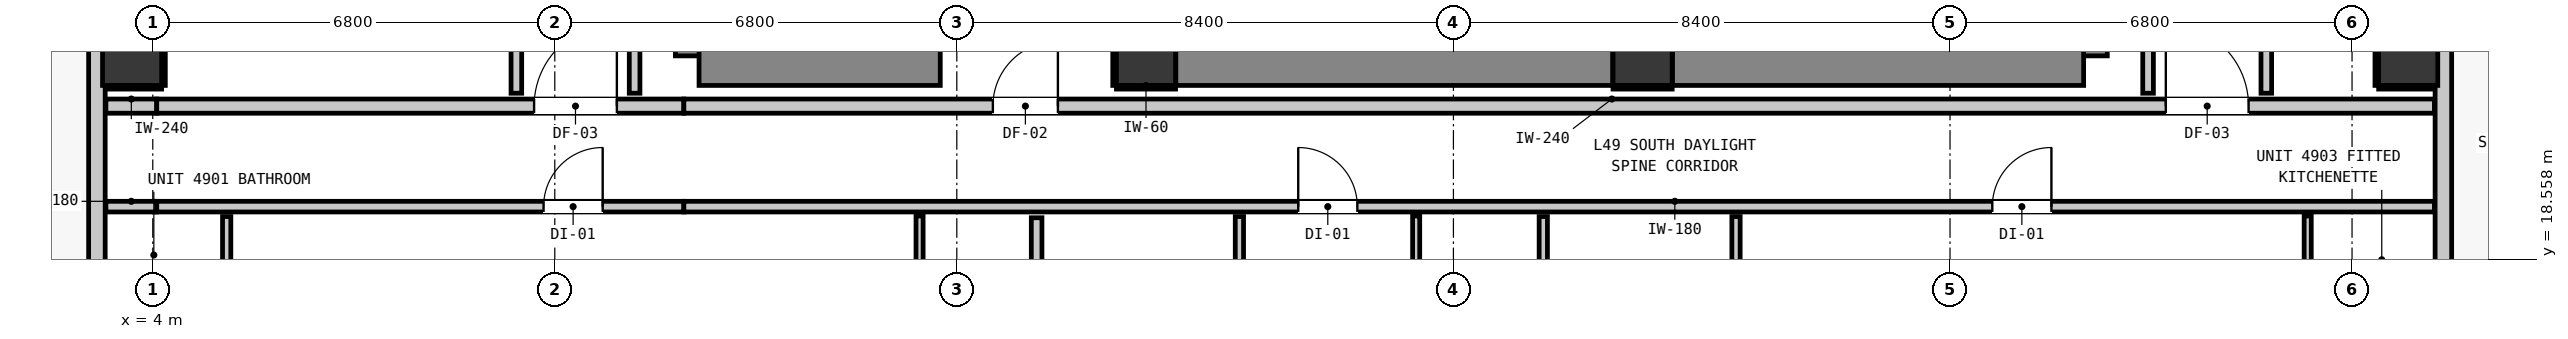
"""IFC4 building model, lengths in metres.
Left out: names, types, materials, properties, quantities, classifications, styles, units other than length and angle.
Written with IfcOpenShell. Run it as: python <this file> out.ifc"""

import sys

from ifc_helpers import new_model, si_unit, direction, frame, frame_2d, origin, origin_2d, place, context, subcontext, project, spatial, rectangle, extrude, element, fill, save


model = new_model("IFC4")
c1 = context("Model", 3, precision=1e-05, world=origin(), true_north=direction((0.0, 1.0)))
c2 = subcontext(c1, "Body", "Model", "MODEL_VIEW")
j1 = project(units=[si_unit("LENGTHUNIT", "METRE"), si_unit("PLANEANGLEUNIT", "RADIAN")], contexts=[c1])
p1 = place(None, origin())
s1 = spatial("IfcSite", under=j1, at=p1, CompositionType="ELEMENT")
p2 = place(p1, origin())
s2 = spatial("IfcBuilding", under=s1, at=p2, CompositionType="ELEMENT")
p3 = place(p2, frame((0.0, 0.0, 169.16)))
s3 = spatial("IfcBuildingStorey", under=s2, at=p3, CompositionType="ELEMENT", Elevation=169.16)
for number, where, z_axis, x_axis in (
    (1, (20.8, 22.0, 0.0), (0.0, 0.0, 1.0), (1.0, 0.0, 0.0)),
    (2, (29.2, 22.0, 0.0), (0.0, 0.0, 1.0), (1.0, 0.0, 0.0)),
):
    element("IfcColumn", number, at=place(p3, frame(where, z_axis=z_axis, x_axis=x_axis)), inside=s3, PredefinedType="COLUMN", context=c2, shape_type="SweptSolid", body=[
        extrude(rectangle(XDim=1.0, YDim=1.0, at=origin_2d()), origin(), (0.0, 0.0, 1.0), 3.32),
    ])
p4 = place(p3, frame((13.34, 22.0, 0.0), z_axis=(0.0, 0.0, 1.0), x_axis=(0.0, 1.0, 0.0)))
e3 = element("IfcWall", 3, at=p4, inside=s3, PredefinedType="SHEAR", context=c2, shape_type="SweptSolid", body=[
    extrude(rectangle(XDim=8.195, YDim=1.0, at=frame_2d((4.098, 0.0))), origin(), (0.0, 0.0, 1.0), 3.32),
])
p5 = place(p3, frame((13.24, 22.0, 0.0), z_axis=(0.0, 0.0, 1.0), x_axis=(1.0, 0.0, 0.0)))
e4 = element("IfcWall", 4, at=p5, inside=s3, PredefinedType="SHEAR", context=c2, shape_type="SweptSolid", body=[
    extrude(rectangle(XDim=4.08, YDim=1.0, at=frame_2d((2.04, 0.0))), origin(), (0.0, 0.0, 1.0), 3.32),
])
p6 = place(p3, frame((36.56, 22.0, 0.0), z_axis=(0.0, 0.0, 1.0), x_axis=(0.0, 1.0, 0.0)))
e5 = element("IfcWall", 5, at=p6, inside=s3, PredefinedType="SHEAR", context=c2, shape_type="SweptSolid", body=[
    extrude(rectangle(XDim=8.195, YDim=1.0, at=frame_2d((4.098, 0.0))), origin(), (0.0, 0.0, 1.0), 3.32),
])
p7 = place(p3, frame((29.705, 22.0, 0.0), z_axis=(0.0, 0.0, 1.0), x_axis=(1.0, 0.0, 0.0)))
e6 = element("IfcWall", 6, at=p7, inside=s3, PredefinedType="SHEAR", context=c2, shape_type="SweptSolid", body=[
    extrude(rectangle(XDim=6.955, YDim=1.0, at=frame_2d((3.478, 0.0))), origin(), (0.0, 0.0, 1.0), 3.32),
])
p8 = place(p3, frame((21.305, 22.0, 0.0), z_axis=(0.0, 0.0, 1.0), x_axis=(1.0, 0.0, 0.0)))
e7 = element("IfcWall", 7, at=p8, inside=s3, PredefinedType="SHEAR", context=c2, shape_type="SweptSolid", body=[
    extrude(rectangle(XDim=7.39, YDim=1.0, at=frame_2d((3.695, 0.0))), origin(), (0.0, 0.0, 1.0), 3.32),
])
for number, where, z_axis, x_axis in (
    (8, (3.65, 22.0, 0.0), (0.0, 0.0, 1.0), (1.0, 0.0, 0.0)),
    (9, (42.15, 22.0, 0.0), (0.0, 0.0, 1.0), (1.0, 0.0, 0.0)),
):
    element("IfcColumn", number, at=place(p3, frame(where, z_axis=z_axis, x_axis=x_axis)), inside=s3, PredefinedType="COLUMN", context=c2, shape_type="SweptSolid", body=[
        extrude(rectangle(XDim=1.0, YDim=1.0, at=origin_2d()), origin(), (0.0, 0.0, 1.0), 3.32),
    ])
p9 = place(p3, frame((3.055, 17.555, 0.0), z_axis=(0.0, 0.0, 1.0), x_axis=(0.0, 1.0, 0.0)))
e10 = element("IfcWall", 10, at=p9, inside=s3, PredefinedType="STANDARD", context=c2, shape_type="SweptSolid", body=[
    extrude(rectangle(XDim=32.29, YDim=0.28, at=frame_2d((16.145, 0.0))), origin(), (0.0, 0.0, 1.0), 2.96),
])
p10 = place(p9, frame((6.871, 0.0, 0.0)))
e11 = element("IfcOpeningElement", 11, at=p10, cuts=e10, PredefinedType="OPENING", context=c2, shape_type="SweptSolid", body=[
    extrude(rectangle(XDim=1.0, YDim=2.15, at=frame_2d((0.5, 1.075))), frame((0.0, 0.15, 0.0), z_axis=(0.0, -1.0, 0.0), x_axis=(1.0, 0.0, 0.0)), (0.0, 0.0, 1.0), 0.3),
])
p11 = place(p9, frame((30.753, 0.0, 0.85)))
e12 = element("IfcOpeningElement", 12, at=p11, cuts=e10, PredefinedType="OPENING", context=c2, shape_type="SweptSolid", body=[
    extrude(rectangle(XDim=1.05, YDim=1.65, at=frame_2d((0.525, 0.825))), frame((0.0, 0.15, 0.0), z_axis=(0.0, -1.0, 0.0), x_axis=(1.0, 0.0, 0.0)), (0.0, 0.0, 1.0), 0.3),
])
p12 = place(p9, frame((8.6, 0.0, 0.85)))
e13 = element("IfcOpeningElement", 13, at=p12, cuts=e10, PredefinedType="OPENING", context=c2, shape_type="SweptSolid", body=[
    extrude(rectangle(XDim=1.05, YDim=1.65, at=frame_2d((0.525, 0.825))), frame((0.0, 0.15, 0.0), z_axis=(0.0, -1.0, 0.0), x_axis=(1.0, 0.0, 0.0)), (0.0, 0.0, 1.0), 0.3),
])
p13 = place(p9, frame((10.612, 0.0, 0.85)))
e14 = element("IfcOpeningElement", 14, at=p13, cuts=e10, PredefinedType="OPENING", context=c2, shape_type="SweptSolid", body=[
    extrude(rectangle(XDim=1.8, YDim=1.9, at=frame_2d((0.9, 0.95))), frame((0.0, 0.15, 0.0), z_axis=(0.0, -1.0, 0.0), x_axis=(1.0, 0.0, 0.0)), (0.0, 0.0, 1.0), 0.3),
])
p14 = place(p9, frame((16.925, 0.0, 0.85)))
e15 = element("IfcOpeningElement", 15, at=p14, cuts=e10, PredefinedType="OPENING", context=c2, shape_type="SweptSolid", body=[
    extrude(rectangle(XDim=1.8, YDim=1.9, at=frame_2d((0.9, 0.95))), frame((0.0, 0.15, 0.0), z_axis=(0.0, -1.0, 0.0), x_axis=(1.0, 0.0, 0.0)), (0.0, 0.0, 1.0), 0.3),
])
p15 = place(p9, frame((20.113, 0.0, 0.85)))
e16 = element("IfcOpeningElement", 16, at=p15, cuts=e10, PredefinedType="OPENING", context=c2, shape_type="SweptSolid", body=[
    extrude(rectangle(XDim=1.05, YDim=1.65, at=frame_2d((0.525, 0.825))), frame((0.0, 0.15, 0.0), z_axis=(0.0, -1.0, 0.0), x_axis=(1.0, 0.0, 0.0)), (0.0, 0.0, 1.0), 0.3),
])
p16 = place(p3, frame((42.745, 49.845, 0.0), z_axis=(0.0, 0.0, 1.0), x_axis=(0.0, -1.0, 0.0)))
e17 = element("IfcWall", 17, at=p16, inside=s3, PredefinedType="STANDARD", context=c2, shape_type="SweptSolid", body=[
    extrude(rectangle(XDim=32.29, YDim=0.28, at=frame_2d((16.145, 0.0))), origin(), (0.0, 0.0, 1.0), 2.96),
])
p17 = place(p16, frame((0.904, 0.0, 0.0)))
e18 = element("IfcOpeningElement", 18, at=p17, cuts=e17, PredefinedType="OPENING", context=c2, shape_type="SweptSolid", body=[
    extrude(rectangle(XDim=1.0, YDim=2.15, at=frame_2d((0.5, 1.075))), frame((0.0, 0.15, 0.0), z_axis=(0.0, -1.0, 0.0), x_axis=(1.0, 0.0, 0.0)), (0.0, 0.0, 1.0), 0.3),
])
p18 = place(p16, frame((2.699, 0.0, 0.85)))
e19 = element("IfcOpeningElement", 19, at=p18, cuts=e17, PredefinedType="OPENING", context=c2, shape_type="SweptSolid", body=[
    extrude(rectangle(XDim=1.8, YDim=1.9, at=frame_2d((0.9, 0.95))), frame((0.0, 0.15, 0.0), z_axis=(0.0, -1.0, 0.0), x_axis=(1.0, 0.0, 0.0)), (0.0, 0.0, 1.0), 0.3),
])
p19 = place(p16, frame((23.02, 0.0, 0.85)))
e20 = element("IfcOpeningElement", 20, at=p19, cuts=e17, PredefinedType="OPENING", context=c2, shape_type="SweptSolid", body=[
    extrude(rectangle(XDim=1.8, YDim=1.9, at=frame_2d((0.9, 0.95))), frame((0.0, 0.15, 0.0), z_axis=(0.0, -1.0, 0.0), x_axis=(1.0, 0.0, 0.0)), (0.0, 0.0, 1.0), 0.3),
])
p20 = place(p16, frame((13.47, 0.0, 0.85)))
e21 = element("IfcOpeningElement", 21, at=p20, cuts=e17, PredefinedType="OPENING", context=c2, shape_type="SweptSolid", body=[
    extrude(rectangle(XDim=1.8, YDim=1.9, at=frame_2d((0.9, 0.95))), frame((0.0, 0.15, 0.0), z_axis=(0.0, -1.0, 0.0), x_axis=(1.0, 0.0, 0.0)), (0.0, 0.0, 1.0), 0.3),
])
p21 = place(p3, frame((3.207, 21.15, 0.0), z_axis=(0.0, 0.0, 1.0), x_axis=(1.0, 0.0, 0.0)))
e22 = element("IfcWall", 22, at=p21, inside=s3, PredefinedType="PARTITIONING", context=c2, shape_type="SweptSolid", body=[
    extrude(rectangle(XDim=0.86, YDim=0.24, at=frame_2d((0.43, 0.0))), origin(), (0.0, 0.0, 1.0), 2.96),
])
p22 = place(p3, frame((4.067, 21.15, 0.0), z_axis=(0.0, 0.0, 1.0), x_axis=(1.0, 0.0, 0.0)))
e23 = element("IfcWall", 23, at=p22, inside=s3, PredefinedType="PARTITIONING", context=c2, shape_type="SweptSolid", body=[
    extrude(rectangle(XDim=8.916, YDim=0.24, at=frame_2d((4.458, 0.0))), origin(), (0.0, 0.0, 1.0), 2.445),
])
p23 = place(p22, frame((6.383, 0.0, 0.0)))
e24 = element("IfcOpeningElement", 24, at=p23, cuts=e23, PredefinedType="OPENING", context=c2, shape_type="SweptSolid", body=[
    extrude(rectangle(XDim=1.4, YDim=2.15, at=frame_2d((0.7, 1.075))), frame((0.0, 0.13, 0.0), z_axis=(0.0, -1.0, 0.0), x_axis=(1.0, 0.0, 0.0)), (0.0, 0.0, 1.0), 0.26),
])
p24 = place(p3, frame((12.983, 21.15, 0.0), z_axis=(0.0, 0.0, 1.0), x_axis=(1.0, 0.0, 0.0)))
e25 = element("IfcWall", 25, at=p24, inside=s3, PredefinedType="PARTITIONING", context=c2, shape_type="SweptSolid", body=[
    extrude(rectangle(XDim=29.61, YDim=0.24, at=frame_2d((14.805, 0.0))), origin(), (0.0, 0.0, 1.0), 2.96),
])
p25 = place(p24, frame((5.227, 0.0, 0.0)))
e26 = element("IfcOpeningElement", 26, at=p25, cuts=e25, PredefinedType="OPENING", context=c2, shape_type="SweptSolid", body=[
    extrude(rectangle(XDim=1.1, YDim=2.15, at=frame_2d((0.55, 1.075))), frame((0.0, 0.13, 0.0), z_axis=(0.0, -1.0, 0.0), x_axis=(1.0, 0.0, 0.0)), (0.0, 0.0, 1.0), 0.26),
])
p26 = place(p24, frame((25.067, 0.0, 0.0)))
e27 = element("IfcOpeningElement", 27, at=p26, cuts=e25, PredefinedType="OPENING", context=c2, shape_type="SweptSolid", body=[
    extrude(rectangle(XDim=1.4, YDim=2.15, at=frame_2d((0.7, 1.075))), frame((0.0, 0.13, 0.0), z_axis=(0.0, -1.0, 0.0), x_axis=(1.0, 0.0, 0.0)), (0.0, 0.0, 1.0), 0.26),
])
p27 = place(p3, frame((3.207, 19.45, 0.0), z_axis=(0.0, 0.0, 1.0), x_axis=(1.0, 0.0, 0.0)))
e28 = element("IfcWall", 28, at=p27, inside=s3, PredefinedType="PARTITIONING", context=c2, shape_type="SweptSolid", body=[
    extrude(rectangle(XDim=0.86, YDim=0.18, at=frame_2d((0.43, 0.0))), origin(), (0.0, 0.0, 1.0), 2.96),
])
p28 = place(p3, frame((4.067, 19.45, 0.0), z_axis=(0.0, 0.0, 1.0), x_axis=(1.0, 0.0, 0.0)))
e29 = element("IfcWall", 29, at=p28, inside=s3, PredefinedType="PARTITIONING", context=c2, shape_type="SweptSolid", body=[
    extrude(rectangle(XDim=8.916, YDim=0.18, at=frame_2d((4.458, 0.0))), origin(), (0.0, 0.0, 1.0), 2.445),
])
p29 = place(p28, frame((6.543, 0.0, 0.0)))
e30 = element("IfcOpeningElement", 30, at=p29, cuts=e29, PredefinedType="OPENING", context=c2, shape_type="SweptSolid", body=[
    extrude(rectangle(XDim=1.0, YDim=2.15, at=frame_2d((0.5, 1.075))), frame((0.0, 0.1, 0.0), z_axis=(0.0, -1.0, 0.0), x_axis=(1.0, 0.0, 0.0)), (0.0, 0.0, 1.0), 0.2),
])
p30 = place(p3, frame((12.983, 19.45, 0.0), z_axis=(0.0, 0.0, 1.0), x_axis=(1.0, 0.0, 0.0)))
e31 = element("IfcWall", 31, at=p30, inside=s3, PredefinedType="PARTITIONING", context=c2, shape_type="SweptSolid", body=[
    extrude(rectangle(XDim=29.61, YDim=0.18, at=frame_2d((14.805, 0.0))), origin(), (0.0, 0.0, 1.0), 2.96),
])
p31 = place(p30, frame((10.392, 0.0, 0.0)))
e32 = element("IfcOpeningElement", 32, at=p31, cuts=e31, PredefinedType="OPENING", context=c2, shape_type="SweptSolid", body=[
    extrude(rectangle(XDim=1.0, YDim=2.15, at=frame_2d((0.5, 1.075))), frame((0.0, 0.1, 0.0), z_axis=(0.0, -1.0, 0.0), x_axis=(1.0, 0.0, 0.0)), (0.0, 0.0, 1.0), 0.2),
])
p32 = place(p30, frame((22.132, 0.0, 0.0)))
e33 = element("IfcOpeningElement", 33, at=p32, cuts=e31, PredefinedType="OPENING", context=c2, shape_type="SweptSolid", body=[
    extrude(rectangle(XDim=1.0, YDim=2.15, at=frame_2d((0.5, 1.075))), frame((0.0, 0.1, 0.0), z_axis=(0.0, -1.0, 0.0), x_axis=(1.0, 0.0, 0.0)), (0.0, 0.0, 1.0), 0.2),
])
p33 = place(p3, frame((10.15, 21.368, 0.0), z_axis=(0.0, 0.0, 1.0), x_axis=(0.0, 1.0, 0.0)))
e34 = element("IfcWall", 34, at=p33, inside=s3, PredefinedType="PARTITIONING", context=c2, shape_type="SweptSolid", body=[
    extrude(rectangle(XDim=2.298, YDim=0.18, at=frame_2d((1.149, 0.0))), origin(), (0.0, 0.0, 1.0), 2.96),
])
p34 = place(p3, frame((12.15, 21.368, 0.0), z_axis=(0.0, 0.0, 1.0), x_axis=(0.0, 1.0, 0.0)))
e35 = element("IfcWall", 35, at=p34, inside=s3, PredefinedType="PARTITIONING", context=c2, shape_type="SweptSolid", body=[
    extrude(rectangle(XDim=18.694, YDim=0.18, at=frame_2d((9.347, 0.0))), origin(), (0.0, 0.0, 1.0), 2.96),
])
p35 = place(p3, frame((18.95, 15.407, 0.0), z_axis=(0.0, 0.0, 1.0), x_axis=(0.0, 1.0, 0.0)))
e36 = element("IfcWall", 36, at=p35, inside=s3, PredefinedType="PARTITIONING", context=c2, shape_type="SweptSolid", body=[
    extrude(rectangle(XDim=3.855, YDim=0.18, at=frame_2d((1.927, 0.0))), origin(), (0.0, 0.0, 1.0), 2.96),
])
p36 = place(p3, frame((37.75, 21.368, 0.0), z_axis=(0.0, 0.0, 1.0), x_axis=(0.0, 1.0, 0.0)))
e37 = element("IfcWall", 37, at=p36, inside=s3, PredefinedType="PARTITIONING", context=c2, shape_type="SweptSolid", body=[
    extrude(rectangle(XDim=18.694, YDim=0.18, at=frame_2d((9.347, 0.0))), origin(), (0.0, 0.0, 1.0), 2.96),
])
p37 = place(p3, frame((39.75, 21.368, 0.0), z_axis=(0.0, 0.0, 1.0), x_axis=(0.0, 1.0, 0.0)))
e38 = element("IfcWall", 38, at=p37, inside=s3, PredefinedType="PARTITIONING", context=c2, shape_type="SweptSolid", body=[
    extrude(rectangle(XDim=2.576, YDim=0.18, at=frame_2d((1.288, 0.0))), origin(), (0.0, 0.0, 1.0), 2.96),
])
p38 = place(p3, frame((5.25, 15.575, 0.0), z_axis=(0.0, 0.0, 1.0), x_axis=(0.0, 1.0, 0.0)))
e39 = element("IfcWall", 39, at=p38, inside=s3, PredefinedType="PARTITIONING", context=c2, shape_type="SweptSolid", body=[
    extrude(rectangle(XDim=3.707, YDim=0.14, at=frame_2d((1.854, 0.0))), origin(), (0.0, 0.0, 1.0), 2.96),
])
p39 = place(p38, frame((1.42, 0.0, 0.0)))
e40 = element("IfcOpeningElement", 40, at=p39, cuts=e39, PredefinedType="OPENING", context=c2, shape_type="SweptSolid", body=[
    extrude(rectangle(XDim=0.86, YDim=2.02, at=frame_2d((0.43, 1.01))), frame((0.0, 0.08, 0.0), z_axis=(0.0, -1.0, 0.0), x_axis=(1.0, 0.0, 0.0)), (0.0, 0.0, 1.0), 0.16),
])
p40 = place(p3, frame((22.38, 15.407, 0.0), z_axis=(0.0, 0.0, 1.0), x_axis=(0.0, 1.0, 0.0)))
e41 = element("IfcWall", 41, at=p40, inside=s3, PredefinedType="PARTITIONING", context=c2, shape_type="SweptSolid", body=[
    extrude(rectangle(XDim=3.875, YDim=0.14, at=frame_2d((1.938, 0.0))), origin(), (0.0, 0.0, 1.0), 2.96),
])
p41 = place(p40, frame((1.588, 0.0, 0.0)))
e42 = element("IfcOpeningElement", 42, at=p41, cuts=e41, PredefinedType="OPENING", context=c2, shape_type="SweptSolid", body=[
    extrude(rectangle(XDim=0.86, YDim=2.02, at=frame_2d((0.43, 1.01))), frame((0.0, 0.08, 0.0), z_axis=(0.0, -1.0, 0.0), x_axis=(1.0, 0.0, 0.0)), (0.0, 0.0, 1.0), 0.16),
])
p42 = place(p3, frame((27.52, 15.407, 0.0), z_axis=(0.0, 0.0, 1.0), x_axis=(0.0, 1.0, 0.0)))
e43 = element("IfcWall", 43, at=p42, inside=s3, PredefinedType="PARTITIONING", context=c2, shape_type="SweptSolid", body=[
    extrude(rectangle(XDim=3.875, YDim=0.14, at=frame_2d((1.938, 0.0))), origin(), (0.0, 0.0, 1.0), 2.96),
])
p43 = place(p3, frame((30.78, 15.407, 0.0), z_axis=(0.0, 0.0, 1.0), x_axis=(0.0, 1.0, 0.0)))
e44 = element("IfcWall", 44, at=p43, inside=s3, PredefinedType="PARTITIONING", context=c2, shape_type="SweptSolid", body=[
    extrude(rectangle(XDim=3.875, YDim=0.14, at=frame_2d((1.938, 0.0))), origin(), (0.0, 0.0, 1.0), 2.96),
])
p44 = place(p43, frame((1.588, 0.0, 0.0)))
e45 = element("IfcOpeningElement", 45, at=p44, cuts=e44, PredefinedType="OPENING", context=c2, shape_type="SweptSolid", body=[
    extrude(rectangle(XDim=0.86, YDim=2.02, at=frame_2d((0.43, 1.01))), frame((0.0, 0.08, 0.0), z_axis=(0.0, -1.0, 0.0), x_axis=(1.0, 0.0, 0.0)), (0.0, 0.0, 1.0), 0.16),
])
p45 = place(p3, frame((16.97, 15.407, 0.0), z_axis=(0.0, 0.0, 1.0), x_axis=(0.0, 1.0, 0.0)))
e46 = element("IfcWall", 46, at=p45, inside=s3, PredefinedType="PARTITIONING", context=c2, shape_type="SweptSolid", body=[
    extrude(rectangle(XDim=3.885, YDim=0.12, at=frame_2d((1.942, 0.0))), origin(), (0.0, 0.0, 1.0), 2.96),
])
p46 = place(p45, frame((1.568, 0.0, 0.0)))
e47 = element("IfcOpeningElement", 47, at=p46, cuts=e46, PredefinedType="OPENING", context=c2, shape_type="SweptSolid", body=[
    extrude(rectangle(XDim=0.9, YDim=2.1, at=frame_2d((0.45, 1.05))), frame((0.0, 0.07, 0.0), z_axis=(0.0, -1.0, 0.0), x_axis=(1.0, 0.0, 0.0)), (0.0, 0.0, 1.0), 0.14),
])
p47 = place(p3, frame((25.37, 15.407, 0.0), z_axis=(0.0, 0.0, 1.0), x_axis=(0.0, 1.0, 0.0)))
e48 = element("IfcWall", 48, at=p47, inside=s3, PredefinedType="PARTITIONING", context=c2, shape_type="SweptSolid", body=[
    extrude(rectangle(XDim=3.885, YDim=0.12, at=frame_2d((1.942, 0.0))), origin(), (0.0, 0.0, 1.0), 2.96),
])
p48 = place(p47, frame((1.568, 0.0, 0.0)))
e49 = element("IfcOpeningElement", 49, at=p48, cuts=e48, PredefinedType="OPENING", context=c2, shape_type="SweptSolid", body=[
    extrude(rectangle(XDim=0.9, YDim=2.1, at=frame_2d((0.45, 1.05))), frame((0.0, 0.07, 0.0), z_axis=(0.0, -1.0, 0.0), x_axis=(1.0, 0.0, 0.0)), (0.0, 0.0, 1.0), 0.14),
])
p49 = place(p3, frame((40.45, 15.475, 0.0), z_axis=(0.0, 0.0, 1.0), x_axis=(0.0, 1.0, 0.0)))
e50 = element("IfcWall", 50, at=p49, inside=s3, PredefinedType="PARTITIONING", context=c2, shape_type="SweptSolid", body=[
    extrude(rectangle(XDim=3.817, YDim=0.12, at=frame_2d((1.908, 0.0))), origin(), (0.0, 0.0, 1.0), 2.96),
])
p50 = place(p49, frame((1.5, 0.0, 0.0)))
e51 = element("IfcOpeningElement", 51, at=p50, cuts=e50, PredefinedType="OPENING", context=c2, shape_type="SweptSolid", body=[
    extrude(rectangle(XDim=0.9, YDim=2.1, at=frame_2d((0.45, 1.05))), frame((0.0, 0.07, 0.0), z_axis=(0.0, -1.0, 0.0), x_axis=(1.0, 0.0, 0.0)), (0.0, 0.0, 1.0), 0.14),
])
for number, where, z_axis, x_axis in (
    (52, (20.3, 21.468, 0.0), (0.0, 0.0, 1.0), (1.0, 0.0, 0.0)),
    (53, (20.268, 21.5, 0.0), (0.0, 0.0, 1.0), (0.0, 1.0, 0.0)),
    (54, (28.7, 21.468, 0.0), (0.0, 0.0, 1.0), (1.0, 0.0, 0.0)),
):
    element("IfcWall", number, at=place(p3, frame(where, z_axis=z_axis, x_axis=x_axis)), inside=s3, PredefinedType="PARTITIONING", context=c2, shape_type="SweptSolid", body=[
        extrude(rectangle(XDim=1.0, YDim=0.06, at=frame_2d((0.5, 0.0))), origin(), (0.0, 0.0, 1.0), 1.45),
    ])
p51 = place(p3, frame((3.21, 21.468, 0.0), z_axis=(0.0, 0.0, 1.0), x_axis=(1.0, 0.0, 0.0)))
e55 = element("IfcWall", 55, at=p51, inside=s3, PredefinedType="PARTITIONING", context=c2, shape_type="SweptSolid", body=[
    extrude(rectangle(XDim=0.94, YDim=0.06, at=frame_2d((0.47, 0.0))), origin(), (0.0, 0.0, 1.0), 1.45),
])
p52 = place(p3, frame((4.182, 21.5, 0.0), z_axis=(0.0, 0.0, 1.0), x_axis=(0.0, 1.0, 0.0)))
e56 = element("IfcWall", 56, at=p52, inside=s3, PredefinedType="PARTITIONING", context=c2, shape_type="SweptSolid", body=[
    extrude(rectangle(XDim=1.0, YDim=0.06, at=frame_2d((0.5, 0.0))), origin(), (0.0, 0.0, 1.0), 1.45),
])
p53 = place(p3, frame((41.65, 21.468, 0.0), z_axis=(0.0, 0.0, 1.0), x_axis=(1.0, 0.0, 0.0)))
e57 = element("IfcWall", 57, at=p53, inside=s3, PredefinedType="PARTITIONING", context=c2, shape_type="SweptSolid", body=[
    extrude(rectangle(XDim=0.94, YDim=0.06, at=frame_2d((0.47, 0.0))), origin(), (0.0, 0.0, 1.0), 1.45),
])
p54 = place(p3, frame((41.618, 21.5, 0.0), z_axis=(0.0, 0.0, 1.0), x_axis=(0.0, 1.0, 0.0)))
e58 = element("IfcWall", 58, at=p54, inside=s3, PredefinedType="PARTITIONING", context=c2, shape_type="SweptSolid", body=[
    extrude(rectangle(XDim=1.0, YDim=0.06, at=frame_2d((0.5, 0.0))), origin(), (0.0, 0.0, 1.0), 1.45),
])
p55 = place(p25, origin())
e59 = element("IfcDoor", 59, at=p55, inside=s3, OperationType="SINGLE_SWING_RIGHT", PredefinedType="DOOR", context=c2, shape_type="SweptSolid", body=[
    extrude(rectangle(XDim=1.1, YDim=2.15, at=frame_2d((0.55, 1.075))), frame((0.0, 0.025, 0.0), z_axis=(0.0, -1.0, 0.0), x_axis=(1.0, 0.0, 0.0)), (0.0, 0.0, 1.0), 0.05),
])
fill(e26, e59)
p56 = place(p23, origin())
e60 = element("IfcDoor", 60, at=p56, inside=s3, OperationType="SINGLE_SWING_RIGHT", PredefinedType="DOOR", context=c2, shape_type="SweptSolid", body=[
    extrude(rectangle(XDim=1.4, YDim=2.15, at=frame_2d((0.7, 1.075))), frame((0.0, 0.025, 0.0), z_axis=(0.0, -1.0, 0.0), x_axis=(1.0, 0.0, 0.0)), (0.0, 0.0, 1.0), 0.05),
])
fill(e24, e60)
p57 = place(p26, origin())
e61 = element("IfcDoor", 61, at=p57, inside=s3, OperationType="SINGLE_SWING_LEFT", PredefinedType="DOOR", context=c2, shape_type="SweptSolid", body=[
    extrude(rectangle(XDim=1.4, YDim=2.15, at=frame_2d((0.7, 1.075))), frame((0.0, 0.025, 0.0), z_axis=(0.0, -1.0, 0.0), x_axis=(1.0, 0.0, 0.0)), (0.0, 0.0, 1.0), 0.05),
])
fill(e27, e61)
p58 = place(p29, origin())
e62 = element("IfcDoor", 62, at=p58, inside=s3, OperationType="SINGLE_SWING_RIGHT", PredefinedType="DOOR", context=c2, shape_type="SweptSolid", body=[
    extrude(rectangle(XDim=1.0, YDim=2.15, at=frame_2d((0.5, 1.075))), frame((0.0, 0.025, 0.0), z_axis=(0.0, -1.0, 0.0), x_axis=(1.0, 0.0, 0.0)), (0.0, 0.0, 1.0), 0.05),
])
fill(e30, e62)
p59 = place(p31, origin())
e63 = element("IfcDoor", 63, at=p59, inside=s3, OperationType="SINGLE_SWING_LEFT", PredefinedType="DOOR", context=c2, shape_type="SweptSolid", body=[
    extrude(rectangle(XDim=1.0, YDim=2.15, at=frame_2d((0.5, 1.075))), frame((0.0, 0.025, 0.0), z_axis=(0.0, -1.0, 0.0), x_axis=(1.0, 0.0, 0.0)), (0.0, 0.0, 1.0), 0.05),
])
fill(e32, e63)
p60 = place(p32, origin())
e64 = element("IfcDoor", 64, at=p60, inside=s3, OperationType="SINGLE_SWING_RIGHT", PredefinedType="DOOR", context=c2, shape_type="SweptSolid", body=[
    extrude(rectangle(XDim=1.0, YDim=2.15, at=frame_2d((0.5, 1.075))), frame((0.0, 0.025, 0.0), z_axis=(0.0, -1.0, 0.0), x_axis=(1.0, 0.0, 0.0)), (0.0, 0.0, 1.0), 0.05),
])
fill(e33, e64)
save(model, sys.argv[1])
